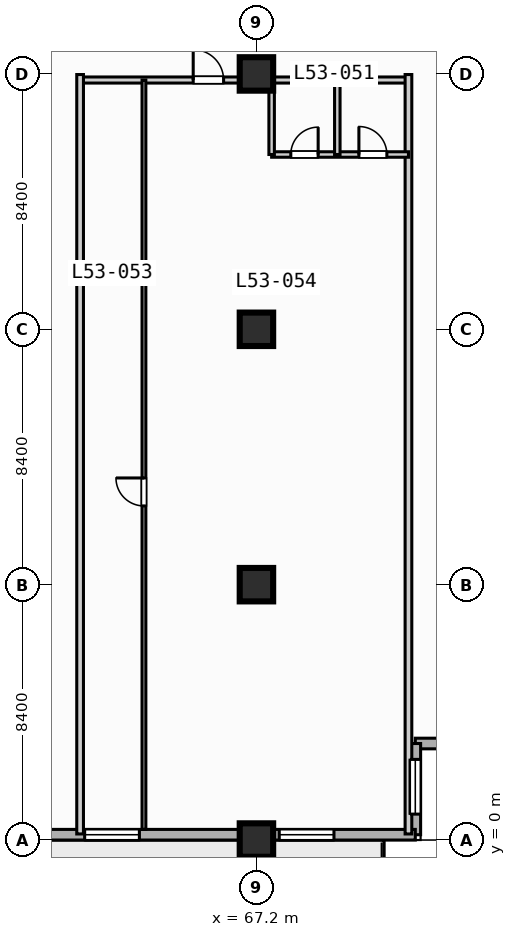
"""IFC4 building model, lengths in metres.
Left out: names, types, materials, properties, quantities, classifications, styles, units other than length and angle.
Written with IfcOpenShell. Run it as: python <this file> out.ifc"""

import sys

from ifc_helpers import new_model, si_unit, direction, frame, frame_2d, origin, origin_2d, place, context, subcontext, project, spatial, rectangle, extrude, element, fill, save


model = new_model("IFC4")
c1 = context("Model", 3, precision=1e-05, world=origin(), true_north=direction((0.0, 1.0)))
c2 = subcontext(c1, "Body", "Model", "MODEL_VIEW")
j1 = project(units=[si_unit("LENGTHUNIT", "METRE"), si_unit("PLANEANGLEUNIT", "RADIAN")], contexts=[c1])
p1 = place(None, origin())
s1 = spatial("IfcSite", under=j1, at=p1, CompositionType="ELEMENT")
p2 = place(p1, origin())
s2 = spatial("IfcBuilding", under=s1, at=p2, CompositionType="ELEMENT")
p3 = place(p2, frame((0.0, 0.0, 216.1)))
s3 = spatial("IfcBuildingStorey", under=s2, at=p3, CompositionType="ELEMENT", Elevation=216.1)
for number, where, z_axis, x_axis in (
    (1, (67.2, 0.0, 0.0), (0.0, 0.0, 1.0), (1.0, 0.0, 0.0)),
    (2, (67.2, 8.4, 0.0), (0.0, 0.0, 1.0), (1.0, 0.0, 0.0)),
    (3, (67.2, 16.8, 0.0), (0.0, 0.0, 1.0), (1.0, 0.0, 0.0)),
    (4, (67.2, 25.2, 0.0), (0.0, 0.0, 1.0), (1.0, 0.0, 0.0)),
):
    element("IfcColumn", number, at=place(p3, frame(where, z_axis=z_axis, x_axis=x_axis)), inside=s3, PredefinedType="COLUMN", context=c2, shape_type="SweptSolid", body=[
        extrude(rectangle(XDim=1.1, YDim=1.1, at=origin_2d()), origin(), (0.0, 0.0, 1.0), 3.7),
    ])
p4 = place(p3, frame((75.425, 3.175, 0.0), z_axis=(0.0, 0.0, 1.0), x_axis=(-1.0, 0.0, 0.0)))
e5 = element("IfcWall", 5, at=p4, inside=s3, PredefinedType="STANDARD", context=c2, shape_type="SweptSolid", body=[
    extrude(rectangle(XDim=3.0, YDim=0.35, at=frame_2d((1.5, 0.0))), origin(), (0.0, 0.0, 1.0), 3.47),
])
p5 = place(p3, frame((72.425, 3.175, 0.0), z_axis=(0.0, 0.0, 1.0), x_axis=(0.0, -1.0, 0.0)))
e6 = element("IfcWall", 6, at=p5, inside=s3, PredefinedType="STANDARD", context=c2, shape_type="SweptSolid", body=[
    extrude(rectangle(XDim=3.0, YDim=0.35, at=frame_2d((1.5, 0.0))), origin(), (0.0, 0.0, 1.0), 3.47),
])
p6 = place(p5, frame((0.522, 0.0, 0.85)))
e7 = element("IfcOpeningElement", 7, at=p6, cuts=e6, PredefinedType="OPENING", context=c2, shape_type="SweptSolid", body=[
    extrude(rectangle(XDim=1.8, YDim=1.8, at=frame_2d((0.9, 0.9))), frame((0.0, 0.185, 0.0), z_axis=(0.0, -1.0, 0.0), x_axis=(1.0, 0.0, 0.0)), (0.0, 0.0, 1.0), 0.37),
])
p7 = place(p3, frame((72.425, 0.175, 0.0), z_axis=(0.0, 0.0, 1.0), x_axis=(-1.0, 0.0, 0.0)))
e8 = element("IfcWall", 8, at=p7, inside=s3, PredefinedType="STANDARD", context=c2, shape_type="SweptSolid", body=[
    extrude(rectangle(XDim=69.25, YDim=0.35, at=frame_2d((34.625, 0.0))), origin(), (0.0, 0.0, 1.0), 3.47),
])
p8 = place(p7, frame((50.725, 0.0, 0.0)))
e9 = element("IfcOpeningElement", 9, at=p8, cuts=e8, PredefinedType="OPENING", context=c2, shape_type="SweptSolid", body=[
    extrude(rectangle(XDim=1.4, YDim=2.2, at=frame_2d((0.7, 1.1))), frame((0.0, 0.185, 0.0), z_axis=(0.0, -1.0, 0.0), x_axis=(1.0, 0.0, 0.0)), (0.0, 0.0, 1.0), 0.37),
])
p9 = place(p7, frame((58.625, 0.0, 0.85)))
e10 = element("IfcOpeningElement", 10, at=p9, cuts=e8, PredefinedType="OPENING", context=c2, shape_type="SweptSolid", body=[
    extrude(rectangle(XDim=2.4, YDim=1.95, at=frame_2d((1.2, 0.975))), frame((0.0, 0.185, 0.0), z_axis=(0.0, -1.0, 0.0), x_axis=(1.0, 0.0, 0.0)), (0.0, 0.0, 1.0), 0.37),
])
p10 = place(p7, frame((33.725, 0.0, 0.85)))
e11 = element("IfcOpeningElement", 11, at=p10, cuts=e8, PredefinedType="OPENING", context=c2, shape_type="SweptSolid", body=[
    extrude(rectangle(XDim=1.8, YDim=1.8, at=frame_2d((0.9, 0.9))), frame((0.0, 0.185, 0.0), z_axis=(0.0, -1.0, 0.0), x_axis=(1.0, 0.0, 0.0)), (0.0, 0.0, 1.0), 0.37),
])
p11 = place(p7, frame((25.025, 0.0, 0.85)))
e12 = element("IfcOpeningElement", 12, at=p11, cuts=e8, PredefinedType="OPENING", context=c2, shape_type="SweptSolid", body=[
    extrude(rectangle(XDim=2.4, YDim=1.95, at=frame_2d((1.2, 0.975))), frame((0.0, 0.185, 0.0), z_axis=(0.0, -1.0, 0.0), x_axis=(1.0, 0.0, 0.0)), (0.0, 0.0, 1.0), 0.37),
])
p12 = place(p7, frame((9.075, 0.0, 0.85)))
e13 = element("IfcOpeningElement", 13, at=p12, cuts=e8, PredefinedType="OPENING", context=c2, shape_type="SweptSolid", body=[
    extrude(rectangle(XDim=1.8, YDim=1.8, at=frame_2d((0.9, 0.9))), frame((0.0, 0.185, 0.0), z_axis=(0.0, -1.0, 0.0), x_axis=(1.0, 0.0, 0.0)), (0.0, 0.0, 1.0), 0.37),
])
p13 = place(p7, frame((2.675, 0.0, 0.85)))
e14 = element("IfcOpeningElement", 14, at=p13, cuts=e8, PredefinedType="OPENING", context=c2, shape_type="SweptSolid", body=[
    extrude(rectangle(XDim=1.8, YDim=1.8, at=frame_2d((0.9, 0.9))), frame((0.0, 0.185, 0.0), z_axis=(0.0, -1.0, 0.0), x_axis=(1.0, 0.0, 0.0)), (0.0, 0.0, 1.0), 0.37),
])
p14 = place(p3, frame((61.4, 25.0, 0.0), z_axis=(0.0, 0.0, 1.0), x_axis=(1.0, 0.0, 0.0)))
e15 = element("IfcWall", 15, at=p14, inside=s3, PredefinedType="PARTITIONING", context=c2, shape_type="SweptSolid", body=[
    extrude(rectangle(XDim=10.8, YDim=0.2, at=frame_2d((5.4, 0.0))), origin(), (0.0, 0.0, 1.0), 2.82),
])
p15 = place(p14, frame((3.72, 0.0, 0.0)))
e16 = element("IfcOpeningElement", 16, at=p15, cuts=e15, PredefinedType="OPENING", context=c2, shape_type="SweptSolid", body=[
    extrude(rectangle(XDim=1.0, YDim=2.15, at=frame_2d((0.5, 1.075))), frame((0.0, 0.11, 0.0), z_axis=(0.0, -1.0, 0.0), x_axis=(1.0, 0.0, 0.0)), (0.0, 0.0, 1.0), 0.22),
])
for number, where, z_axis, x_axis in (
    (17, (61.4, 0.2, 0.0), (0.0, 0.0, 1.0), (0.0, 1.0, 0.0)),
    (18, (72.2, 0.2, 0.0), (0.0, 0.0, 1.0), (0.0, 1.0, 0.0)),
):
    element("IfcWall", number, at=place(p3, frame(where, z_axis=z_axis, x_axis=x_axis)), inside=s3, PredefinedType="PARTITIONING", context=c2, shape_type="SweptSolid", body=[
        extrude(rectangle(XDim=24.98, YDim=0.22, at=frame_2d((12.49, 0.0))), origin(), (0.0, 0.0, 1.0), 3.47),
    ])
p16 = place(p3, frame((67.7, 22.55, 0.0), z_axis=(0.0, 0.0, 1.0), x_axis=(1.0, 0.0, 0.0)))
e19 = element("IfcWall", 19, at=p16, inside=s3, PredefinedType="PLUMBINGWALL", context=c2, shape_type="SweptSolid", body=[
    extrude(rectangle(XDim=4.5, YDim=0.18, at=frame_2d((2.25, 0.0))), origin(), (0.0, 0.0, 1.0), 3.47),
])
p17 = place(p16, frame((0.63, 0.0, 0.0)))
e20 = element("IfcOpeningElement", 20, at=p17, cuts=e19, PredefinedType="OPENING", context=c2, shape_type="SweptSolid", body=[
    extrude(rectangle(XDim=0.9, YDim=2.1, at=frame_2d((0.45, 1.05))), frame((0.0, 0.1, 0.0), z_axis=(0.0, -1.0, 0.0), x_axis=(1.0, 0.0, 0.0)), (0.0, 0.0, 1.0), 0.2),
])
p18 = place(p16, frame((2.87, 0.0, 0.0)))
e21 = element("IfcOpeningElement", 21, at=p18, cuts=e19, PredefinedType="OPENING", context=c2, shape_type="SweptSolid", body=[
    extrude(rectangle(XDim=0.92, YDim=2.1, at=frame_2d((0.46, 1.05))), frame((0.0, 0.1, 0.0), z_axis=(0.0, -1.0, 0.0), x_axis=(1.0, 0.0, 0.0)), (0.0, 0.0, 1.0), 0.2),
])
for number, where, z_axis, x_axis in (
    (22, (67.7, 22.55, 0.0), (0.0, 0.0, 1.0), (0.0, 1.0, 0.0)),
    (23, (69.86, 22.55, 0.0), (0.0, 0.0, 1.0), (0.0, 1.0, 0.0)),
):
    element("IfcWall", number, at=place(p3, frame(where, z_axis=z_axis, x_axis=x_axis)), inside=s3, PredefinedType="PLUMBINGWALL", context=c2, shape_type="SweptSolid", body=[
        extrude(rectangle(XDim=2.45, YDim=0.18, at=frame_2d((1.225, 0.0))), origin(), (0.0, 0.0, 1.0), 3.47),
    ])
p19 = place(p3, frame((63.5, 0.35, 0.0), z_axis=(0.0, 0.0, 1.0), x_axis=(0.0, 1.0, 0.0)))
e24 = element("IfcWall", 24, at=p19, inside=s3, PredefinedType="PARTITIONING", context=c2, shape_type="SweptSolid", body=[
    extrude(rectangle(XDim=24.65, YDim=0.125, at=frame_2d((12.325, 0.0))), origin(), (0.0, 0.0, 1.0), 3.47),
])
p20 = place(p19, frame((10.64, 0.0, 0.0)))
e25 = element("IfcOpeningElement", 25, at=p20, cuts=e24, PredefinedType="OPENING", context=c2, shape_type="SweptSolid", body=[
    extrude(rectangle(XDim=0.92, YDim=2.1, at=frame_2d((0.46, 1.05))), frame((0.0, 0.073, 0.0), z_axis=(0.0, -1.0, 0.0), x_axis=(1.0, 0.0, 0.0)), (0.0, 0.0, 1.0), 0.145),
])
p21 = place(p6, origin())
e26 = element("IfcWindow", 26, at=p21, inside=s3, PartitioningType="SINGLE_PANEL", PredefinedType="WINDOW", context=c2, shape_type="SweptSolid", body=[
    extrude(rectangle(XDim=1.8, YDim=1.8, at=frame_2d((0.9, 0.9))), frame((0.0, 0.03, 0.0), z_axis=(0.0, -1.0, 0.0), x_axis=(1.0, 0.0, 0.0)), (0.0, 0.0, 1.0), 0.06),
])
fill(e7, e26)
p22 = place(p12, origin())
e27 = element("IfcWindow", 27, at=p22, inside=s3, PartitioningType="SINGLE_PANEL", PredefinedType="WINDOW", context=c2, shape_type="SweptSolid", body=[
    extrude(rectangle(XDim=1.8, YDim=1.8, at=frame_2d((0.9, 0.9))), frame((0.0, 0.03, 0.0), z_axis=(0.0, -1.0, 0.0), x_axis=(1.0, 0.0, 0.0)), (0.0, 0.0, 1.0), 0.06),
])
fill(e13, e27)
p23 = place(p13, origin())
e28 = element("IfcWindow", 28, at=p23, inside=s3, PartitioningType="SINGLE_PANEL", PredefinedType="WINDOW", context=c2, shape_type="SweptSolid", body=[
    extrude(rectangle(XDim=1.8, YDim=1.8, at=frame_2d((0.9, 0.9))), frame((0.0, 0.03, 0.0), z_axis=(0.0, -1.0, 0.0), x_axis=(1.0, 0.0, 0.0)), (0.0, 0.0, 1.0), 0.06),
])
fill(e14, e28)
p24 = place(p15, origin())
e29 = element("IfcDoor", 29, at=p24, inside=s3, OperationType="SINGLE_SWING_LEFT", PredefinedType="DOOR", context=c2, shape_type="SweptSolid", body=[
    extrude(rectangle(XDim=1.0, YDim=2.15, at=frame_2d((0.5, 1.075))), frame((0.0, 0.025, 0.0), z_axis=(0.0, -1.0, 0.0), x_axis=(1.0, 0.0, 0.0)), (0.0, 0.0, 1.0), 0.05),
])
fill(e16, e29)
p25 = place(p17, origin())
e30 = element("IfcDoor", 30, at=p25, inside=s3, OperationType="SINGLE_SWING_RIGHT", PredefinedType="DOOR", context=c2, shape_type="SweptSolid", body=[
    extrude(rectangle(XDim=0.9, YDim=2.1, at=frame_2d((0.45, 1.05))), frame((0.0, 0.025, 0.0), z_axis=(0.0, -1.0, 0.0), x_axis=(1.0, 0.0, 0.0)), (0.0, 0.0, 1.0), 0.05),
])
fill(e20, e30)
p26 = place(p18, origin())
e31 = element("IfcDoor", 31, at=p26, inside=s3, OperationType="SINGLE_SWING_LEFT", PredefinedType="DOOR", context=c2, shape_type="SweptSolid", body=[
    extrude(rectangle(XDim=0.92, YDim=2.1, at=frame_2d((0.46, 1.05))), frame((0.0, 0.025, 0.0), z_axis=(0.0, -1.0, 0.0), x_axis=(1.0, 0.0, 0.0)), (0.0, 0.0, 1.0), 0.05),
])
fill(e21, e31)
p27 = place(p20, origin())
e32 = element("IfcDoor", 32, at=p27, inside=s3, OperationType="SINGLE_SWING_RIGHT", PredefinedType="DOOR", context=c2, shape_type="SweptSolid", body=[
    extrude(rectangle(XDim=0.92, YDim=2.1, at=frame_2d((0.46, 1.05))), frame((0.0, 0.025, 0.0), z_axis=(0.0, -1.0, 0.0), x_axis=(1.0, 0.0, 0.0)), (0.0, 0.0, 1.0), 0.05),
])
fill(e25, e32)
save(model, sys.argv[1])
